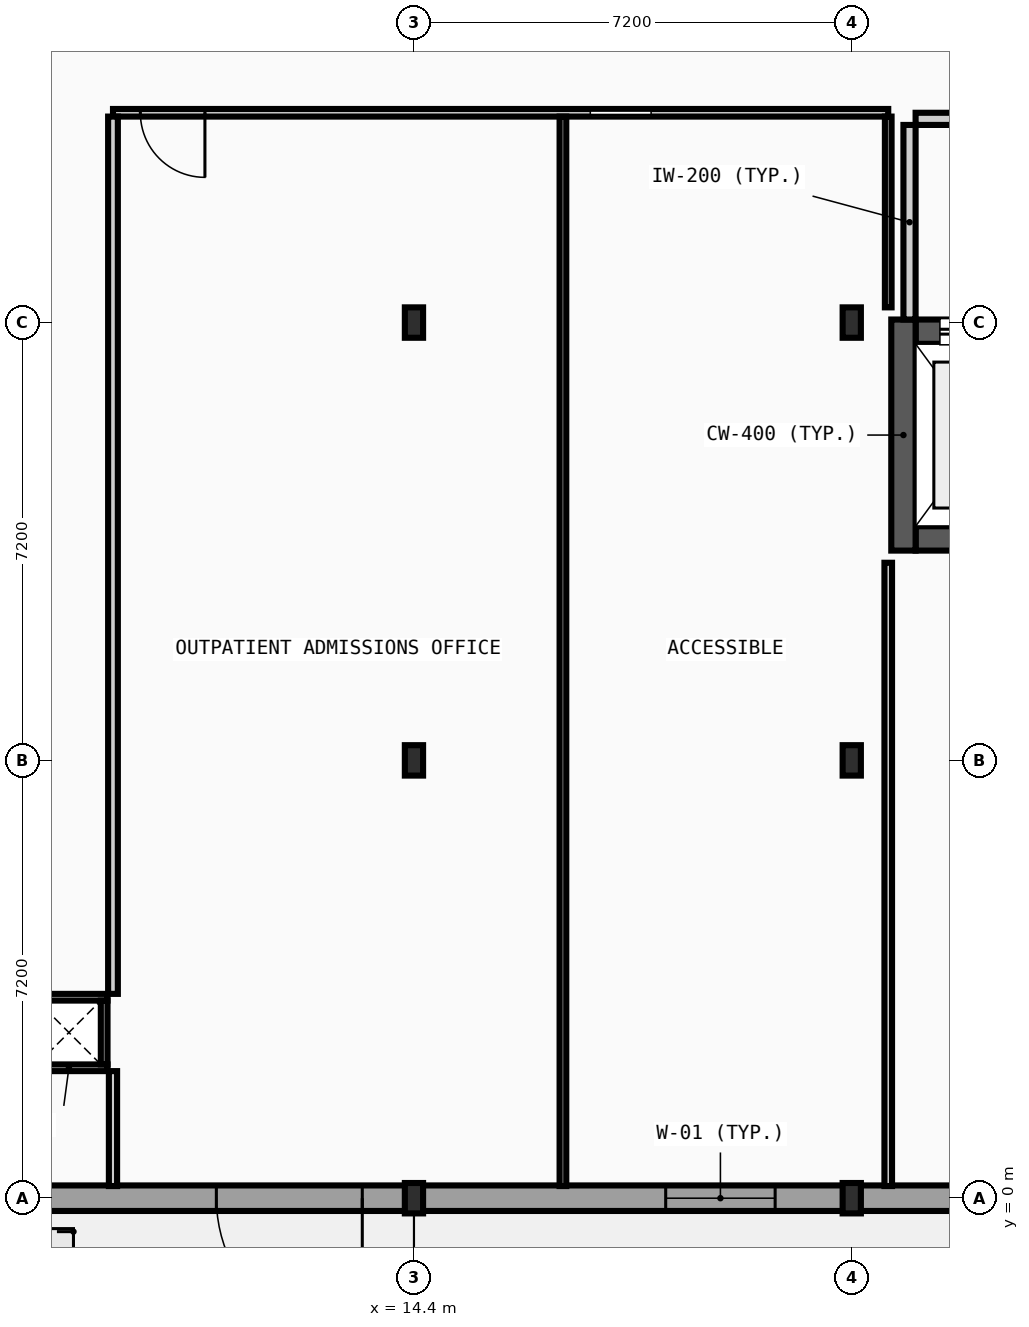
"""IFC4 building model, lengths in metres.
Left out: names, types, materials, properties, quantities, classifications, styles, units other than length and angle.
Written with IfcOpenShell. Run it as: python <this file> out.ifc"""

import sys

from ifc_helpers import new_model, si_unit, direction, frame, frame_2d, origin, origin_2d, place, context, subcontext, project, spatial, rectangle, i_section, extrude, element, fill, save


model = new_model("IFC4")
c1 = context("Model", 3, precision=1e-05, world=origin(), true_north=direction((0.0, 1.0)))
c2 = subcontext(c1, "Body", "Model", "MODEL_VIEW")
j1 = project(units=[si_unit("LENGTHUNIT", "METRE"), si_unit("PLANEANGLEUNIT", "RADIAN")], contexts=[c1])
p1 = place(None, origin())
s1 = spatial("IfcSite", under=j1, at=p1, CompositionType="ELEMENT")
p2 = place(p1, origin())
s2 = spatial("IfcBuilding", under=s1, at=p2, CompositionType="ELEMENT")
p3 = place(p2, origin())
s3 = spatial("IfcBuildingStorey", under=s2, at=p3, CompositionType="ELEMENT", Elevation=0.0)
for number, where, z_axis, x_axis in (
    (1, (14.4, 0.0, 0.0), (0.0, 0.0, 1.0), (1.0, 0.0, 0.0)),
    (2, (14.4, 7.2, 0.0), (0.0, 0.0, 1.0), (1.0, 0.0, 0.0)),
    (3, (14.4, 14.4, 0.0), (0.0, 0.0, 1.0), (1.0, 0.0, 0.0)),
    (4, (21.6, 0.0, 0.0), (0.0, 0.0, 1.0), (1.0, 0.0, 0.0)),
    (5, (21.6, 7.2, 0.0), (0.0, 0.0, 1.0), (1.0, 0.0, 0.0)),
    (6, (21.6, 14.4, 0.0), (0.0, 0.0, 1.0), (1.0, 0.0, 0.0)),
):
    element("IfcColumn", number, at=place(p3, frame(where, z_axis=z_axis, x_axis=x_axis)), inside=s3, PredefinedType="COLUMN", context=c2, shape_type="SweptSolid", body=[
        extrude(i_section(OverallWidth=0.3, OverallDepth=0.5, WebThickness=0.014, FlangeThickness=0.028, FilletRadius=0.027, at=origin_2d()), origin(), (0.0, 0.0, 1.0), 5.2),
    ])
p4 = place(p3, frame((7.2, 0.0, 0.0), z_axis=(0.0, 0.0, 1.0), x_axis=(1.0, 0.0, 0.0)))
e7 = element("IfcWall", 7, at=p4, inside=s3, PredefinedType="STANDARD", context=c2, shape_type="SweptSolid", body=[
    extrude(rectangle(XDim=7.2, YDim=0.42, at=frame_2d((3.6, 0.0))), origin(), (0.0, 0.0, 1.0), 4.665),
])
p5 = place(p4, frame((3.95, 0.0, 0.0)))
e8 = element("IfcOpeningElement", 8, at=p5, cuts=e7, PredefinedType="OPENING", context=c2, shape_type="SweptSolid", body=[
    extrude(rectangle(XDim=2.4, YDim=2.5, at=frame_2d((1.2, 1.25))), frame((0.0, 0.22, 0.0), z_axis=(0.0, -1.0, 0.0), x_axis=(1.0, 0.0, 0.0)), (0.0, 0.0, 1.0), 0.44),
])
p6 = place(p3, frame((14.4, 0.0, 0.0), z_axis=(0.0, 0.0, 1.0), x_axis=(1.0, 0.0, 0.0)))
e9 = element("IfcWall", 9, at=p6, inside=s3, PredefinedType="STANDARD", context=c2, shape_type="SweptSolid", body=[
    extrude(rectangle(XDim=7.2, YDim=0.42, at=frame_2d((3.6, 0.0))), origin(), (0.0, 0.0, 1.0), 4.665),
])
p7 = place(p6, frame((4.14, 0.0, 0.9)))
e10 = element("IfcOpeningElement", 10, at=p7, cuts=e9, PredefinedType="OPENING", context=c2, shape_type="SweptSolid", body=[
    extrude(rectangle(XDim=1.8, YDim=1.8, at=frame_2d((0.9, 0.9))), frame((0.0, 0.22, 0.0), z_axis=(0.0, -1.0, 0.0), x_axis=(1.0, 0.0, 0.0)), (0.0, 0.0, 1.0), 0.44),
])
p8 = place(p3, frame((21.6, 0.0, 0.0), z_axis=(0.0, 0.0, 1.0), x_axis=(1.0, 0.0, 0.0)))
e11 = element("IfcWall", 11, at=p8, inside=s3, PredefinedType="STANDARD", context=c2, shape_type="SweptSolid", body=[
    extrude(rectangle(XDim=6.99, YDim=0.42, at=frame_2d((3.495, 0.0))), origin(), (0.0, 0.0, 1.0), 4.665),
])
p9 = place(p3, frame((22.65, 10.85, 0.0), z_axis=(0.0, 0.0, 1.0), x_axis=(1.0, 0.0, 0.0)))
e12 = element("IfcWall", 12, at=p9, inside=s3, PredefinedType="SHEAR", context=c2, shape_type="SweptSolid", body=[
    extrude(rectangle(XDim=2.2, YDim=0.4, at=frame_2d((1.1, 0.0))), origin(), (0.0, 0.0, 1.0), 4.97),
])
p10 = place(p3, frame((22.65, 14.25, 0.0), z_axis=(0.0, 0.0, 1.0), x_axis=(1.0, 0.0, 0.0)))
e13 = element("IfcWall", 13, at=p10, inside=s3, PredefinedType="SHEAR", context=c2, shape_type="SweptSolid", body=[
    extrude(rectangle(XDim=2.2, YDim=0.4, at=frame_2d((1.1, 0.0))), origin(), (0.0, 0.0, 1.0), 4.97),
])
p11 = place(p10, frame((0.4, 0.0, 0.0)))
e14 = element("IfcOpeningElement", 14, at=p11, cuts=e13, PredefinedType="OPENING", context=c2, shape_type="SweptSolid", body=[
    extrude(rectangle(XDim=1.4, YDim=2.2, at=frame_2d((0.7, 1.1))), frame((0.0, 0.21, 0.0), z_axis=(0.0, -1.0, 0.0), x_axis=(1.0, 0.0, 0.0)), (0.0, 0.0, 1.0), 0.42),
])
p12 = place(p3, frame((22.45, 10.65, 0.0), z_axis=(0.0, 0.0, 1.0), x_axis=(0.0, 1.0, 0.0)))
e15 = element("IfcWall", 15, at=p12, inside=s3, PredefinedType="SHEAR", context=c2, shape_type="SweptSolid", body=[
    extrude(rectangle(XDim=3.8, YDim=0.4, at=frame_2d((1.9, 0.0))), origin(), (0.0, 0.0, 1.0), 4.97),
])
p13 = place(p3, frame((22.65, 17.75, 0.0), z_axis=(0.0, 0.0, 1.0), x_axis=(1.0, 0.0, 0.0)))
e16 = element("IfcWall", 16, at=p13, inside=s3, PredefinedType="PARTITIONING", context=c2, shape_type="SweptSolid", body=[
    extrude(rectangle(XDim=5.75, YDim=0.2, at=frame_2d((2.875, 0.0))), origin(), (0.0, 0.0, 1.0), 4.97),
])
p14 = place(p13, frame((2.075, 0.0, 0.0)))
e17 = element("IfcOpeningElement", 17, at=p14, cuts=e16, PredefinedType="OPENING", context=c2, shape_type="SweptSolid", body=[
    extrude(rectangle(XDim=1.6, YDim=2.2, at=frame_2d((0.8, 1.1))), frame((0.0, 0.11, 0.0), z_axis=(0.0, -1.0, 0.0), x_axis=(1.0, 0.0, 0.0)), (0.0, 0.0, 1.0), 0.22),
])
p15 = place(p3, frame((22.55, 14.45, 0.0), z_axis=(0.0, 0.0, 1.0), x_axis=(0.0, 1.0, 0.0)))
e18 = element("IfcWall", 18, at=p15, inside=s3, PredefinedType="PARTITIONING", context=c2, shape_type="SweptSolid", body=[
    extrude(rectangle(XDim=3.2, YDim=0.2, at=frame_2d((1.6, 0.0))), origin(), (0.0, 0.0, 1.0), 4.97),
])
for number, where, z_axis, x_axis in (
    (19, (8.09, 2.145, 0.0), (0.0, 0.0, 1.0), (1.0, 0.0, 0.0)),
    (20, (8.09, 3.305, 0.0), (0.0, 0.0, 1.0), (1.0, 0.0, 0.0)),
):
    element("IfcWall", number, at=place(p3, frame(where, z_axis=z_axis, x_axis=x_axis)), inside=s3, PredefinedType="PARTITIONING", context=c2, shape_type="SweptSolid", body=[
        extrude(rectangle(XDim=1.27, YDim=0.11, at=frame_2d((0.635, 0.0))), origin(), (0.0, 0.0, 1.0), 4.97),
    ])
p16 = place(p3, frame((9.305, 2.2, 0.0), z_axis=(0.0, 0.0, 1.0), x_axis=(0.0, 1.0, 0.0)))
e21 = element("IfcWall", 21, at=p16, inside=s3, PredefinedType="PARTITIONING", context=c2, shape_type="SweptSolid", body=[
    extrude(rectangle(XDim=1.05, YDim=0.11, at=frame_2d((0.525, 0.0))), origin(), (0.0, 0.0, 1.0), 4.97),
])
p17 = place(p3, frame((9.45, 17.85, 0.0), z_axis=(0.0, 0.0, 1.0), x_axis=(1.0, 0.0, 0.0)))
e22 = element("IfcWall", 22, at=p17, inside=s3, PredefinedType="PARTITIONING", context=c2, shape_type="SweptSolid", body=[
    extrude(rectangle(XDim=12.75, YDim=0.125, at=frame_2d((6.375, 0.0))), origin(), (0.0, 0.0, 1.0), 4.97),
])
p18 = place(p17, frame((7.85, 0.0, 0.0)))
e23 = element("IfcOpeningElement", 23, at=p18, cuts=e22, PredefinedType="OPENING", context=c2, shape_type="SweptSolid", body=[
    extrude(rectangle(XDim=1.0, YDim=2.1, at=frame_2d((0.5, 1.05))), frame((0.0, 0.073, 0.0), z_axis=(0.0, -1.0, 0.0), x_axis=(1.0, 0.0, 0.0)), (0.0, 0.0, 1.0), 0.145),
])
p19 = place(p17, frame((0.45, 0.0, 0.0)))
e24 = element("IfcOpeningElement", 24, at=p19, cuts=e22, PredefinedType="OPENING", context=c2, shape_type="SweptSolid", body=[
    extrude(rectangle(XDim=1.062, YDim=2.068, at=frame_2d((0.531, 1.034))), frame((0.0, 0.073, 0.0), z_axis=(0.0, -1.0, 0.0), x_axis=(1.0, 0.0, 0.0)), (0.0, 0.0, 1.0), 0.145),
])
p20 = place(p3, frame((9.45, 0.2, 0.0), z_axis=(0.0, 0.0, 1.0), x_axis=(0.0, 1.0, 0.0)))
e25 = element("IfcWall", 25, at=p20, inside=s3, PredefinedType="PARTITIONING", context=c2, shape_type="SweptSolid", body=[
    extrude(rectangle(XDim=1.89, YDim=0.135, at=frame_2d((0.945, 0.0))), origin(), (0.0, 0.0, 1.0), 4.655),
])
p21 = place(p3, frame((9.45, 3.36, 0.0), z_axis=(0.0, 0.0, 1.0), x_axis=(0.0, 1.0, 0.0)))
e26 = element("IfcWall", 26, at=p21, inside=s3, PredefinedType="PARTITIONING", context=c2, shape_type="SweptSolid", body=[
    extrude(rectangle(XDim=14.427, YDim=0.16, at=frame_2d((7.214, 0.0))), origin(), (0.0, 0.0, 1.0), 4.655),
])
p22 = place(p3, frame((16.85, 0.2, 0.0), z_axis=(0.0, 0.0, 1.0), x_axis=(0.0, 1.0, 0.0)))
e27 = element("IfcWall", 27, at=p22, inside=s3, PredefinedType="PARTITIONING", context=c2, shape_type="SweptSolid", body=[
    extrude(rectangle(XDim=17.588, YDim=0.11, at=frame_2d((8.794, 0.0))), origin(), (0.0, 0.0, 1.0), 4.655),
])
p23 = place(p3, frame((22.2, 0.2, 0.0), z_axis=(0.0, 0.0, 1.0), x_axis=(0.0, 1.0, 0.0)))
e28 = element("IfcWall", 28, at=p23, inside=s3, PredefinedType="PARTITIONING", context=c2, shape_type="SweptSolid", body=[
    extrude(rectangle(XDim=10.25, YDim=0.125, at=frame_2d((5.125, 0.0))), origin(), (0.0, 0.0, 1.0), 4.97),
])
p24 = place(p3, frame((22.2, 14.65, 0.0), z_axis=(0.0, 0.0, 1.0), x_axis=(0.0, 1.0, 0.0)))
e29 = element("IfcWall", 29, at=p24, inside=s3, PredefinedType="PARTITIONING", context=c2, shape_type="SweptSolid", body=[
    extrude(rectangle(XDim=3.138, YDim=0.11, at=frame_2d((1.569, 0.0))), origin(), (0.0, 0.0, 1.0), 4.97),
])
p25 = place(p7, origin())
e30 = element("IfcWindow", 30, at=p25, inside=s3, PartitioningType="SINGLE_PANEL", PredefinedType="WINDOW", context=c2, shape_type="SweptSolid", body=[
    extrude(rectangle(XDim=1.8, YDim=1.8, at=frame_2d((0.9, 0.9))), frame((0.0, 0.03, 0.0), z_axis=(0.0, -1.0, 0.0), x_axis=(1.0, 0.0, 0.0)), (0.0, 0.0, 1.0), 0.06),
])
fill(e10, e30)
p26 = place(p5, origin())
e31 = element("IfcDoor", 31, at=p26, inside=s3, OperationType="DOUBLE_DOOR_SINGLE_SWING", PredefinedType="DOOR", context=c2, shape_type="SweptSolid", body=[
    extrude(rectangle(XDim=2.4, YDim=2.5, at=frame_2d((1.2, 1.25))), frame((0.0, 0.025, 0.0), z_axis=(0.0, -1.0, 0.0), x_axis=(1.0, 0.0, 0.0)), (0.0, 0.0, 1.0), 0.05),
])
fill(e8, e31)
p27 = place(p11, origin())
e32 = element("IfcDoor", 32, at=p27, inside=s3, OperationType="SLIDING_TO_LEFT", PredefinedType="DOOR", context=c2, shape_type="SweptSolid", body=[
    extrude(rectangle(XDim=1.4, YDim=2.2, at=frame_2d((0.7, 1.1))), frame((0.0, 0.025, 0.0), z_axis=(0.0, -1.0, 0.0), x_axis=(1.0, 0.0, 0.0)), (0.0, 0.0, 1.0), 0.05),
])
fill(e14, e32)
p28 = place(p18, origin())
e33 = element("IfcDoor", 33, at=p28, inside=s3, OperationType="SLIDING_TO_LEFT", PredefinedType="DOOR", context=c2, shape_type="SweptSolid", body=[
    extrude(rectangle(XDim=1.0, YDim=2.1, at=frame_2d((0.5, 1.05))), frame((0.0, 0.025, 0.0), z_axis=(0.0, -1.0, 0.0), x_axis=(1.0, 0.0, 0.0)), (0.0, 0.0, 1.0), 0.05),
])
fill(e23, e33)
p29 = place(p19, origin())
e34 = element("IfcDoor", 34, at=p29, inside=s3, OperationType="SINGLE_SWING_RIGHT", PredefinedType="DOOR", context=c2, shape_type="SweptSolid", body=[
    extrude(rectangle(XDim=1.062, YDim=2.068, at=frame_2d((0.531, 1.034))), frame((0.0, 0.025, 0.0), z_axis=(0.0, -1.0, 0.0), x_axis=(1.0, 0.0, 0.0)), (0.0, 0.0, 1.0), 0.05),
])
fill(e24, e34)
save(model, sys.argv[1])
